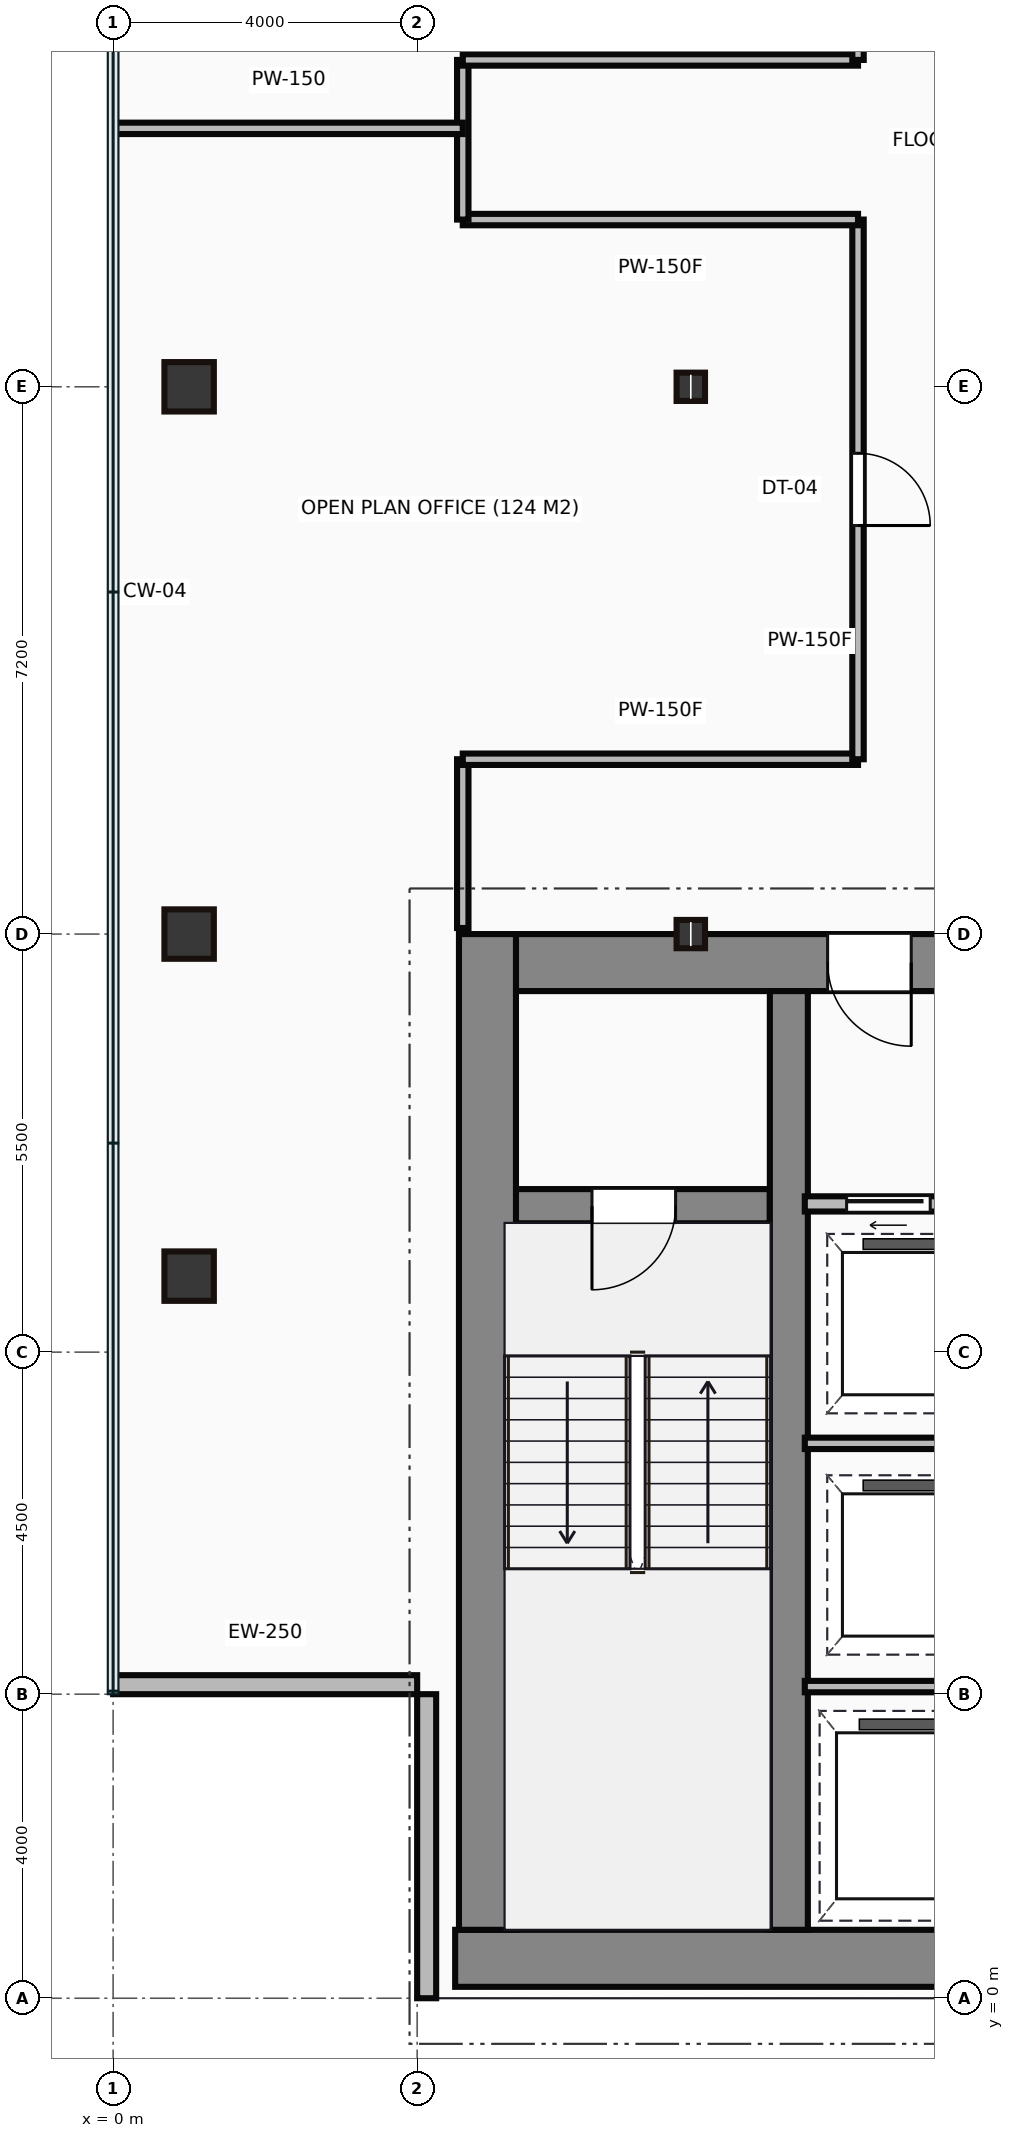
"""IFC4 building model, lengths in metres.
Left out: names, types, materials, properties, quantities, classifications, styles, units other than length and angle.
Written with IfcOpenShell. Run it as: python <this file> out.ifc"""

import sys

from ifc_helpers import new_model, si_unit, direction, frame, frame_2d, origin, origin_2d, place, context, subcontext, project, spatial, rectangle, hollow_rectangle, i_section, extrude, source, transform, mapped, element, fill, save


model = new_model("IFC4")
c1 = context("Model", 3, precision=1e-05, world=origin(), true_north=direction((0.0, 1.0)))
c2 = subcontext(c1, "Body", "Model", "MODEL_VIEW")
j1 = project(units=[si_unit("LENGTHUNIT", "METRE"), si_unit("PLANEANGLEUNIT", "RADIAN")], contexts=[c1])
p1 = place(None, origin())
s1 = spatial("IfcSite", under=j1, at=p1, CompositionType="ELEMENT")
p2 = place(p1, origin())
s2 = spatial("IfcBuilding", under=s1, at=p2, CompositionType="ELEMENT")
p3 = place(p2, frame((0.0, 0.0, 155.2)))
s3 = spatial("IfcBuildingStorey", under=s2, at=p3, CompositionType="ELEMENT", Elevation=155.2)
m1 = source(origin(), c2, "Body", "SweptSolid", [
    extrude(rectangle(XDim=29.5, YDim=0.75, at=frame_2d((14.75, 0.0))), origin(), (0.0, 0.0, 1.0), 3.65),
])
p4 = place(p3, frame((4.5, 0.525, 0.0), z_axis=(0.0, 0.0, 1.0), x_axis=(1.0, 0.0, 0.0)))
e1 = element("IfcWall", 1, at=p4, inside=s3, PredefinedType="SHEAR", context=c2, shape_type="MappedRepresentation", body=[
    mapped(m1, transform((0.0, 0.0, 0.0))),
])
m2 = source(origin(), c2, "Body", "SweptSolid", [
    extrude(rectangle(XDim=13.1, YDim=0.75, at=frame_2d((6.55, 0.0))), origin(), (0.0, 0.0, 1.0), 3.65),
])
p5 = place(p3, frame((4.925, 0.9, 0.0), z_axis=(0.0, 0.0, 1.0), x_axis=(0.0, 1.0, 0.0)))
e2 = element("IfcWall", 2, at=p5, inside=s3, PredefinedType="SHEAR", context=c2, shape_type="MappedRepresentation", body=[
    mapped(m2, transform((0.0, 0.0, 0.0))),
])
m3 = source(origin(), c2, "Body", "SweptSolid", [
    extrude(rectangle(XDim=9.1, YDim=0.75, at=frame_2d((4.55, 0.0))), origin(), (0.0, 0.0, 1.0), 3.65),
])
p6 = place(p3, frame((5.3, 13.625, 0.0), z_axis=(0.0, 0.0, 1.0), x_axis=(1.0, 0.0, 0.0)))
e3 = element("IfcWall", 3, at=p6, inside=s3, PredefinedType="SHEAR", context=c2, shape_type="MappedRepresentation", body=[
    mapped(m3, transform((0.0, 0.0, 0.0))),
])
p7 = place(p6, frame((4.1, 0.0, 0.0)))
e4 = element("IfcOpeningElement", 4, at=p7, cuts=e3, PredefinedType="OPENING", context=c2, shape_type="SweptSolid", body=[
    extrude(rectangle(XDim=1.1, YDim=2.15, at=frame_2d((0.55, 1.075))), frame((0.0, 0.385, 0.0), z_axis=(0.0, -1.0, 0.0), x_axis=(1.0, 0.0, 0.0)), (0.0, 0.0, 1.0), 0.77),
])
m4 = source(origin(), c2, "Body", "SweptSolid", [
    extrude(rectangle(XDim=12.35, YDim=0.5, at=frame_2d((6.175, 0.0))), origin(), (0.0, 0.0, 1.0), 3.65),
])
p8 = place(p3, frame((8.89, 0.9, 0.0), z_axis=(0.0, 0.0, 1.0), x_axis=(0.0, 1.0, 0.0)))
e5 = element("IfcWall", 5, at=p8, inside=s3, PredefinedType="SHEAR", context=c2, shape_type="MappedRepresentation", body=[
    mapped(m4, transform((0.0, 0.0, 0.0))),
])
m5 = source(origin(), c2, "Body", "SweptSolid", [
    extrude(rectangle(XDim=3.39, YDim=0.45, at=frame_2d((1.695, 0.0))), origin(), (0.0, 0.0, 1.0), 3.65),
])
p9 = place(p3, frame((5.25, 10.42, 0.0), z_axis=(0.0, 0.0, 1.0), x_axis=(1.0, 0.0, 0.0)))
e6 = element("IfcWall", 6, at=p9, inside=s3, PredefinedType="SHEAR", context=c2, shape_type="MappedRepresentation", body=[
    mapped(m5, transform((0.0, 0.0, 0.0))),
])
p10 = place(p9, frame((1.05, 0.0, 0.0)))
e7 = element("IfcOpeningElement", 7, at=p10, cuts=e6, PredefinedType="OPENING", context=c2, shape_type="SweptSolid", body=[
    extrude(rectangle(XDim=1.1, YDim=2.15, at=frame_2d((0.55, 1.075))), frame((0.0, 0.235, 0.0), z_axis=(0.0, -1.0, 0.0), x_axis=(1.0, 0.0, 0.0)), (0.0, 0.0, 1.0), 0.47),
])
m6 = source(origin(), c2, "Body", "SweptSolid", [
    extrude(hollow_rectangle(XDim=0.65, YDim=0.65, WallThickness=0.032, at=origin_2d()), origin(), (0.0, 0.0, 1.0), 3.65),
])
for number, where, z_axis, x_axis in (
    (8, (1.0, 9.5, 0.0), (0.0, 0.0, 1.0), (1.0, 0.0, 0.0)),
    (9, (1.0, 14.0, 0.0), (0.0, 0.0, 1.0), (1.0, 0.0, 0.0)),
    (10, (1.0, 21.2, 0.0), (0.0, 0.0, 1.0), (1.0, 0.0, 0.0)),
):
    element("IfcColumn", number, at=place(p3, frame(where, z_axis=z_axis, x_axis=x_axis)), inside=s3, PredefinedType="COLUMN", context=c2, shape_type="MappedRepresentation", body=[
        mapped(m6, transform((0.0, 0.0, 0.0))),
    ])
m7 = source(origin(), c2, "Body", "SweptSolid", [
    extrude(i_section(OverallWidth=0.374, OverallDepth=0.372, WebThickness=0.016, FlangeThickness=0.026, at=origin_2d()), origin(), (0.0, 0.0, 1.0), 3.65),
])
for number, where, z_axis, x_axis in (
    (11, (7.6, 14.0, 0.0), (0.0, 0.0, 1.0), (1.0, 0.0, 0.0)),
    (12, (7.6, 21.2, 0.0), (0.0, 0.0, 1.0), (1.0, 0.0, 0.0)),
):
    element("IfcColumn", number, at=place(p3, frame(where, z_axis=z_axis, x_axis=x_axis)), inside=s3, PredefinedType="COLUMN", context=c2, shape_type="MappedRepresentation", body=[
        mapped(m7, transform((0.0, 0.0, 0.0))),
    ])
m8 = source(origin(), c2, "Body", "SweptSolid", [
    extrude(rectangle(XDim=4.0, YDim=0.25, at=frame_2d((2.0, 0.0))), origin(), (0.0, 0.0, 1.0), 3.4),
])
for number, where, z_axis, x_axis in (
    (13, (0.0, 4.125, 0.0), (0.0, 0.0, 1.0), (1.0, 0.0, 0.0)),
    (14, (4.125, 4.0, 0.0), (0.0, 0.0, 1.0), (0.0, -1.0, 0.0)),
):
    element("IfcWall", number, at=place(p3, frame(where, z_axis=z_axis, x_axis=x_axis)), inside=s3, PredefinedType="STANDARD", context=c2, shape_type="MappedRepresentation", body=[
        mapped(m8, transform((0.0, 0.0, 0.0))),
    ])
m9 = source(origin(), c2, "Body", "SweptSolid", [
    extrude(rectangle(XDim=2.35, YDim=0.2, at=frame_2d((1.175, 0.0))), origin(), (0.0, 0.0, 1.0), 3.4),
])
p11 = place(p3, frame((9.1, 10.45, 0.0), z_axis=(0.0, 0.0, 1.0), x_axis=(1.0, 0.0, 0.0)))
e15 = element("IfcWall", 15, at=p11, inside=s3, PredefinedType="PARTITIONING", context=c2, shape_type="MappedRepresentation", body=[
    mapped(m9, transform((0.0, 0.0, 0.0))),
])
p12 = place(p11, frame((0.55, 0.0, 0.0)))
e16 = element("IfcOpeningElement", 16, at=p12, cuts=e15, PredefinedType="OPENING", context=c2, shape_type="SweptSolid", body=[
    extrude(rectangle(XDim=1.1, YDim=2.15, at=frame_2d((0.55, 1.075))), frame((0.0, 0.11, 0.0), z_axis=(0.0, -1.0, 0.0), x_axis=(1.0, 0.0, 0.0)), (0.0, 0.0, 1.0), 0.22),
])
m10 = source(origin(), c2, "Body", "SweptSolid", [
    extrude(rectangle(XDim=2.4, YDim=0.15, at=frame_2d((1.2, 0.0))), origin(), (0.0, 0.0, 1.0), 3.4),
])
for number, where, z_axis, x_axis in (
    (17, (9.1, 4.1, 0.0), (0.0, 0.0, 1.0), (1.0, 0.0, 0.0)),
    (18, (9.1, 7.3, 0.0), (0.0, 0.0, 1.0), (1.0, 0.0, 0.0)),
):
    element("IfcWall", number, at=place(p3, frame(where, z_axis=z_axis, x_axis=x_axis)), inside=s3, PredefinedType="PARTITIONING", context=c2, shape_type="MappedRepresentation", body=[
        mapped(m10, transform((0.0, 0.0, 0.0))),
    ])
m11 = source(origin(), c2, "Body", "SweptSolid", [
    extrude(rectangle(XDim=2.22, YDim=0.15, at=frame_2d((1.11, 0.0))), origin(), (0.0, 0.0, 1.0), 3.4),
])
p13 = place(p3, frame((4.6, 14.08, 0.0), z_axis=(0.0, 0.0, 1.0), x_axis=(0.0, 1.0, 0.0)))
e19 = element("IfcWall", 19, at=p13, inside=s3, PredefinedType="PARTITIONING", context=c2, shape_type="MappedRepresentation", body=[
    mapped(m11, transform((0.0, 0.0, 0.0))),
])
m12 = source(origin(), c2, "Body", "SweptSolid", [
    extrude(rectangle(XDim=5.2, YDim=0.15, at=frame_2d((2.6, 0.0))), origin(), (0.0, 0.0, 1.0), 3.4),
])
p14 = place(p3, frame((4.6, 16.3, 0.0), z_axis=(0.0, 0.0, 1.0), x_axis=(1.0, 0.0, 0.0)))
e20 = element("IfcWall", 20, at=p14, inside=s3, PredefinedType="PARTITIONING", context=c2, shape_type="MappedRepresentation", body=[
    mapped(m12, transform((0.0, 0.0, 0.0))),
])
m13 = source(origin(), c2, "Body", "SweptSolid", [
    extrude(rectangle(XDim=7.1, YDim=0.15, at=frame_2d((3.55, 0.0))), origin(), (0.0, 0.0, 1.0), 3.4),
])
p15 = place(p3, frame((9.8, 16.3, 0.0), z_axis=(0.0, 0.0, 1.0), x_axis=(0.0, 1.0, 0.0)))
e21 = element("IfcWall", 21, at=p15, inside=s3, PredefinedType="PARTITIONING", context=c2, shape_type="MappedRepresentation", body=[
    mapped(m13, transform((0.0, 0.0, 0.0))),
])
p16 = place(p15, frame((3.075, 0.0, 0.0)))
e22 = element("IfcOpeningElement", 22, at=p16, cuts=e21, PredefinedType="OPENING", context=c2, shape_type="SweptSolid", body=[
    extrude(rectangle(XDim=0.95, YDim=2.15, at=frame_2d((0.475, 1.075))), frame((0.0, 0.085, 0.0), z_axis=(0.0, -1.0, 0.0), x_axis=(1.0, 0.0, 0.0)), (0.0, 0.0, 1.0), 0.17),
])
m14 = source(origin(), c2, "Body", "SweptSolid", [
    extrude(rectangle(XDim=5.2, YDim=0.15, at=frame_2d((2.6, 0.0))), origin(), (0.0, 0.0, 1.0), 3.041),
])
p17 = place(p3, frame((9.8, 23.4, 0.0), z_axis=(0.0, 0.0, 1.0), x_axis=(-1.0, 0.0, 0.0)))
e23 = element("IfcWall", 23, at=p17, inside=s3, PredefinedType="PARTITIONING", context=c2, shape_type="MappedRepresentation", body=[
    mapped(m14, transform((0.0, 0.0, 0.0))),
])
m15 = source(origin(), c2, "Body", "SweptSolid", [
    extrude(rectangle(XDim=2.1, YDim=0.15, at=frame_2d((1.05, 0.0))), origin(), (0.0, 0.0, 1.0), 3.4),
])
p18 = place(p3, frame((4.6, 23.4, 0.0), z_axis=(0.0, 0.0, 1.0), x_axis=(0.0, 1.0, 0.0)))
e24 = element("IfcWall", 24, at=p18, inside=s3, PredefinedType="PARTITIONING", context=c2, shape_type="MappedRepresentation", body=[
    mapped(m15, transform((0.0, 0.0, 0.0))),
])
p19 = place(p3, frame((4.6, 25.5, 0.0), z_axis=(0.0, 0.0, 1.0), x_axis=(1.0, 0.0, 0.0)))
e25 = element("IfcWall", 25, at=p19, inside=s3, PredefinedType="PARTITIONING", context=c2, shape_type="MappedRepresentation", body=[
    mapped(m14, transform((0.0, 0.0, 0.0))),
])
m16 = source(origin(), c2, "Body", "SweptSolid", [
    extrude(rectangle(XDim=9.0, YDim=0.15, at=frame_2d((4.5, 0.0))), origin(), (0.0, 0.0, 1.0), 3.4),
])
p20 = place(p3, frame((9.8, 25.5, 0.0), z_axis=(0.0, 0.0, 1.0), x_axis=(0.0, 1.0, 0.0)))
e26 = element("IfcWall", 26, at=p20, inside=s3, PredefinedType="PARTITIONING", context=c2, shape_type="MappedRepresentation", body=[
    mapped(m16, transform((0.0, 0.0, 0.0))),
])
p21 = place(p20, frame((3.305, 0.0, 0.0)))
e27 = element("IfcOpeningElement", 27, at=p21, cuts=e26, PredefinedType="OPENING", context=c2, shape_type="SweptSolid", body=[
    extrude(rectangle(XDim=0.95, YDim=2.15, at=frame_2d((0.475, 1.075))), frame((0.0, 0.085, 0.0), z_axis=(0.0, -1.0, 0.0), x_axis=(1.0, 0.0, 0.0)), (0.0, 0.0, 1.0), 0.17),
])
m17 = source(origin(), c2, "Body", "SweptSolid", [
    extrude(rectangle(XDim=4.58, YDim=0.15, at=frame_2d((2.29, 0.0))), origin(), (0.0, 0.0, 1.0), 3.4),
])
p22 = place(p3, frame((0.02, 24.6, 0.0), z_axis=(0.0, 0.0, 1.0), x_axis=(1.0, 0.0, 0.0)))
e28 = element("IfcWall", 28, at=p22, inside=s3, PredefinedType="PARTITIONING", context=c2, shape_type="MappedRepresentation", body=[
    mapped(m17, transform((0.0, 0.0, 0.0))),
])
m18 = source(origin(), c2, "Body", "SweptSolid", [
    extrude(rectangle(XDim=1.1, YDim=2.15, at=frame_2d((0.55, 1.075))), frame((0.0, 0.025, 0.0), z_axis=(0.0, -1.0, 0.0), x_axis=(1.0, 0.0, 0.0)), (0.0, 0.0, 1.0), 0.05),
])
p23 = place(p10, frame((1.1, 0.0, 0.0), z_axis=(0.0, 0.0, 1.0), x_axis=(-1.0, 0.0, 0.0)))
e29 = element("IfcDoor", 29, at=p23, inside=s3, OperationType="SINGLE_SWING_LEFT", PredefinedType="DOOR", context=c2, shape_type="MappedRepresentation", body=[
    mapped(m18, transform((0.0, 0.0, 0.0))),
])
fill(e7, e29)
p24 = place(p7, origin())
e30 = element("IfcDoor", 30, at=p24, inside=s3, OperationType="SINGLE_SWING_RIGHT", PredefinedType="DOOR", context=c2, shape_type="MappedRepresentation", body=[
    mapped(m18, transform((0.0, 0.0, 0.0))),
])
fill(e4, e30)
p25 = place(p12, origin())
e31 = element("IfcDoor", 31, at=p25, inside=s3, OperationType="SLIDING_TO_LEFT", PredefinedType="DOOR", context=c2, shape_type="MappedRepresentation", body=[
    mapped(m18, transform((0.0, 0.0, 0.0))),
])
fill(e16, e31)
m19 = source(origin(), c2, "Body", "SweptSolid", [
    extrude(rectangle(XDim=0.95, YDim=2.15, at=frame_2d((0.475, 1.075))), frame((0.0, 0.025, 0.0), z_axis=(0.0, -1.0, 0.0), x_axis=(1.0, 0.0, 0.0)), (0.0, 0.0, 1.0), 0.05),
])
p26 = place(p16, origin())
e32 = element("IfcDoor", 32, at=p26, inside=s3, OperationType="SINGLE_SWING_LEFT", PredefinedType="DOOR", context=c2, shape_type="MappedRepresentation", body=[
    mapped(m19, transform((0.0, 0.0, 0.0))),
])
fill(e22, e32)
save(model, sys.argv[1])
